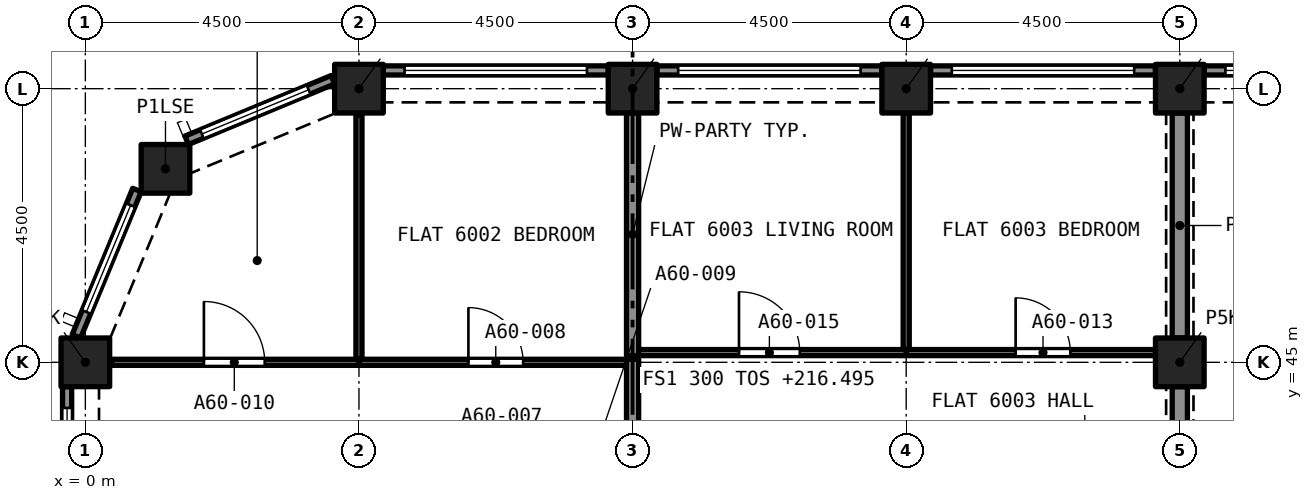
"""IFC4 building model, lengths in metres.
Left out: names, types, materials, properties, quantities, classifications, styles, units other than length and angle.
Written with IfcOpenShell. Run it as: python <this file> out.ifc"""

import sys

from ifc_helpers import new_model, si_unit, direction, frame, frame_2d, origin, origin_2d, place, context, subcontext, project, spatial, rectangle, extrude, element, fill, save


model = new_model("IFC4")
c1 = context("Model", 3, precision=1e-05, world=origin(), true_north=direction((0.0, 1.0)))
c2 = subcontext(c1, "Body", "Model", "MODEL_VIEW")
j1 = project(units=[si_unit("LENGTHUNIT", "METRE"), si_unit("PLANEANGLEUNIT", "RADIAN")], contexts=[c1])
p1 = place(None, origin())
s1 = spatial("IfcSite", under=j1, at=p1, CompositionType="ELEMENT")
p2 = place(p1, origin())
s2 = spatial("IfcBuilding", under=s1, at=p2, CompositionType="ELEMENT")
p3 = place(p2, frame((0.0, 0.0, 216.495)))
s3 = spatial("IfcBuildingStorey", under=s2, at=p3, CompositionType="ELEMENT", Elevation=216.495)
for number, where, z_axis, x_axis in (
    (1, (0.0, 45.0, 0.0), (0.0, 0.0, 1.0), (1.0, 0.0, 0.0)),
    (2, (18.0, 45.0, 0.0), (0.0, 0.0, 1.0), (1.0, 0.0, 0.0)),
    (3, (1.318, 48.182, 0.0), (0.0, 0.0, 1.0), (1.0, 0.0, 0.0)),
    (4, (4.5, 49.5, 0.0), (0.0, 0.0, 1.0), (1.0, 0.0, 0.0)),
    (5, (9.0, 49.5, 0.0), (0.0, 0.0, 1.0), (1.0, 0.0, 0.0)),
    (6, (13.5, 49.5, 0.0), (0.0, 0.0, 1.0), (1.0, 0.0, 0.0)),
    (7, (18.0, 49.5, 0.0), (0.0, 0.0, 1.0), (1.0, 0.0, 0.0)),
):
    element("IfcColumn", number, at=place(p3, frame(where, z_axis=z_axis, x_axis=x_axis)), inside=s3, PredefinedType="COLUMN", context=c2, shape_type="SweptSolid", body=[
        extrude(rectangle(XDim=0.8, YDim=0.8, at=origin_2d()), origin(), (0.0, 0.0, 1.0), 3.2),
    ])
p4 = place(p3, frame((18.4, 49.8, 0.0), z_axis=(0.0, 0.0, 1.0), x_axis=(1.0, 0.0, 0.0)))
e8 = element("IfcWall", 8, at=p4, inside=s3, PredefinedType="SOLIDWALL", context=c2, shape_type="SweptSolid", body=[
    extrude(rectangle(XDim=3.7, YDim=0.15, at=frame_2d((1.85, 0.0))), origin(), (0.0, 0.0, 1.0), 3.2),
])
p5 = place(p4, frame((0.35, 0.0, 0.45)))
e9 = element("IfcOpeningElement", 9, at=p5, cuts=e8, PredefinedType="OPENING", context=c2, shape_type="SweptSolid", body=[
    extrude(rectangle(XDim=3.0, YDim=1.95, at=frame_2d((1.5, 0.975))), frame((0.0, 0.085, 0.0), z_axis=(0.0, -1.0, 0.0), x_axis=(1.0, 0.0, 0.0)), (0.0, 0.0, 1.0), 0.17),
])
p6 = place(p3, frame((13.9, 49.8, 0.0), z_axis=(0.0, 0.0, 1.0), x_axis=(1.0, 0.0, 0.0)))
e10 = element("IfcWall", 10, at=p6, inside=s3, PredefinedType="SOLIDWALL", context=c2, shape_type="SweptSolid", body=[
    extrude(rectangle(XDim=3.7, YDim=0.15, at=frame_2d((1.85, 0.0))), origin(), (0.0, 0.0, 1.0), 3.2),
])
p7 = place(p6, frame((0.35, 0.0, 0.45)))
e11 = element("IfcOpeningElement", 11, at=p7, cuts=e10, PredefinedType="OPENING", context=c2, shape_type="SweptSolid", body=[
    extrude(rectangle(XDim=3.0, YDim=1.95, at=frame_2d((1.5, 0.975))), frame((0.0, 0.085, 0.0), z_axis=(0.0, -1.0, 0.0), x_axis=(1.0, 0.0, 0.0)), (0.0, 0.0, 1.0), 0.17),
])
p8 = place(p3, frame((9.4, 49.8, 0.0), z_axis=(0.0, 0.0, 1.0), x_axis=(1.0, 0.0, 0.0)))
e12 = element("IfcWall", 12, at=p8, inside=s3, PredefinedType="SOLIDWALL", context=c2, shape_type="SweptSolid", body=[
    extrude(rectangle(XDim=3.7, YDim=0.15, at=frame_2d((1.85, 0.0))), origin(), (0.0, 0.0, 1.0), 3.2),
])
p9 = place(p8, frame((0.35, 0.0, 0.45)))
e13 = element("IfcOpeningElement", 13, at=p9, cuts=e12, PredefinedType="OPENING", context=c2, shape_type="SweptSolid", body=[
    extrude(rectangle(XDim=3.0, YDim=1.95, at=frame_2d((1.5, 0.975))), frame((0.0, 0.085, 0.0), z_axis=(0.0, -1.0, 0.0), x_axis=(1.0, 0.0, 0.0)), (0.0, 0.0, 1.0), 0.17),
])
p10 = place(p3, frame((4.9, 49.8, 0.0), z_axis=(0.0, 0.0, 1.0), x_axis=(1.0, 0.0, 0.0)))
e14 = element("IfcWall", 14, at=p10, inside=s3, PredefinedType="SOLIDWALL", context=c2, shape_type="SweptSolid", body=[
    extrude(rectangle(XDim=3.7, YDim=0.15, at=frame_2d((1.85, 0.0))), origin(), (0.0, 0.0, 1.0), 3.2),
])
p11 = place(p10, frame((0.35, 0.0, 0.45)))
e15 = element("IfcOpeningElement", 15, at=p11, cuts=e14, PredefinedType="OPENING", context=c2, shape_type="SweptSolid", body=[
    extrude(rectangle(XDim=3.0, YDim=1.95, at=frame_2d((1.5, 0.975))), frame((0.0, 0.085, 0.0), z_axis=(0.0, -1.0, 0.0), x_axis=(1.0, 0.0, 0.0)), (0.0, 0.0, 1.0), 0.17),
])
p12 = place(p3, frame((1.667, 48.651, 0.0), z_axis=(0.0, 0.0, 1.0), x_axis=(0.923885342263, 0.382669406082, 0.0)))
e16 = element("IfcWall", 16, at=p12, inside=s3, PredefinedType="SOLIDWALL", context=c2, shape_type="SweptSolid", body=[
    extrude(rectangle(XDim=2.602, YDim=0.15, at=frame_2d((1.301, 0.0))), origin(), (0.0, 0.0, 1.0), 3.2),
])
p13 = place(p12, frame((0.27, 0.0, 0.45)))
e17 = element("IfcOpeningElement", 17, at=p13, cuts=e16, PredefinedType="OPENING", context=c2, shape_type="SweptSolid", body=[
    extrude(rectangle(XDim=1.9, YDim=1.95, at=frame_2d((0.95, 0.975))), frame((0.0, 0.085, 0.0), z_axis=(0.0, -1.0, 0.0), x_axis=(1.0, 0.0, 0.0)), (0.0, 0.0, 1.0), 0.17),
])
p14 = place(p3, frame((-0.147, 45.429, 0.0), z_axis=(0.0, 0.0, 1.0), x_axis=(0.382669406082, 0.923885342263, 0.0)))
e18 = element("IfcWall", 18, at=p14, inside=s3, PredefinedType="SOLIDWALL", context=c2, shape_type="SweptSolid", body=[
    extrude(rectangle(XDim=2.602, YDim=0.15, at=frame_2d((1.301, 0.0))), origin(), (0.0, 0.0, 1.0), 3.2),
])
p15 = place(p14, frame((0.432, 0.0, 0.45)))
e19 = element("IfcOpeningElement", 19, at=p15, cuts=e18, PredefinedType="OPENING", context=c2, shape_type="SweptSolid", body=[
    extrude(rectangle(XDim=1.9, YDim=1.95, at=frame_2d((0.95, 0.975))), frame((0.0, 0.085, 0.0), z_axis=(0.0, -1.0, 0.0), x_axis=(1.0, 0.0, 0.0)), (0.0, 0.0, 1.0), 0.17),
])
p16 = place(p3, frame((-0.3, 40.9, 0.0), z_axis=(0.0, 0.0, 1.0), x_axis=(0.0, 1.0, 0.0)))
e20 = element("IfcWall", 20, at=p16, inside=s3, PredefinedType="SOLIDWALL", context=c2, shape_type="SweptSolid", body=[
    extrude(rectangle(XDim=3.7, YDim=0.15, at=frame_2d((1.85, 0.0))), origin(), (0.0, 0.0, 1.0), 3.2),
])
p17 = place(p16, frame((0.35, 0.0, 0.45)))
e21 = element("IfcOpeningElement", 21, at=p17, cuts=e20, PredefinedType="OPENING", context=c2, shape_type="SweptSolid", body=[
    extrude(rectangle(XDim=3.0, YDim=1.95, at=frame_2d((1.5, 0.975))), frame((0.0, 0.085, 0.0), z_axis=(0.0, -1.0, 0.0), x_axis=(1.0, 0.0, 0.0)), (0.0, 0.0, 1.0), 0.17),
])
p18 = place(p3, frame((4.5, 45.0, 0.0), z_axis=(0.0, 0.0, 1.0), x_axis=(1.0, 0.0, 0.0)))
e22 = element("IfcWall", 22, at=p18, inside=s3, PredefinedType="PARTITIONING", context=c2, shape_type="SweptSolid", body=[
    extrude(rectangle(XDim=4.4, YDim=0.1, at=frame_2d((2.2, 0.0))), origin(), (0.0, 0.0, 1.0), 2.9),
])
p19 = place(p18, frame((1.8, 0.0, 0.0)))
e23 = element("IfcOpeningElement", 23, at=p19, cuts=e22, PredefinedType="OPENING", context=c2, shape_type="SweptSolid", body=[
    extrude(rectangle(XDim=0.9, YDim=2.1, at=frame_2d((0.45, 1.05))), frame((0.0, 0.06, 0.0), z_axis=(0.0, -1.0, 0.0), x_axis=(1.0, 0.0, 0.0)), (0.0, 0.0, 1.0), 0.12),
])
p20 = place(p3, frame((4.5, 45.05, 0.0), z_axis=(0.0, 0.0, 1.0), x_axis=(0.0, 1.0, 0.0)))
e24 = element("IfcWall", 24, at=p20, inside=s3, PredefinedType="PARTITIONING", context=c2, shape_type="SweptSolid", body=[
    extrude(rectangle(XDim=4.017, YDim=0.1, at=frame_2d((2.009, 0.0))), origin(), (0.0, 0.0, 1.0), 2.9),
])
p21 = place(p3, frame((9.0, 45.11, 0.0), z_axis=(0.0, 0.0, 1.0), x_axis=(0.0, 1.0, 0.0)))
e25 = element("IfcWall", 25, at=p21, inside=s3, PredefinedType="PARTITIONING", context=c2, shape_type="SweptSolid", body=[
    extrude(rectangle(XDim=3.99, YDim=0.2, at=frame_2d((1.995, 0.0))), origin(), (0.0, 0.0, 1.0), 2.9),
])
p22 = place(p3, frame((0.433, 45.0, 0.0), z_axis=(0.0, 0.0, 1.0), x_axis=(1.0, 0.0, 0.0)))
e26 = element("IfcWall", 26, at=p22, inside=s3, PredefinedType="PARTITIONING", context=c2, shape_type="SweptSolid", body=[
    extrude(rectangle(XDim=4.067, YDim=0.1, at=frame_2d((2.034, 0.0))), origin(), (0.0, 0.0, 1.0), 2.9),
])
p23 = place(p22, frame((1.517, 0.0, 0.0)))
e27 = element("IfcOpeningElement", 27, at=p23, cuts=e26, PredefinedType="OPENING", context=c2, shape_type="SweptSolid", body=[
    extrude(rectangle(XDim=1.0, YDim=2.1, at=frame_2d((0.5, 1.05))), frame((0.0, 0.06, 0.0), z_axis=(0.0, -1.0, 0.0), x_axis=(1.0, 0.0, 0.0)), (0.0, 0.0, 1.0), 0.12),
])
p24 = place(p3, frame((9.0, 43.677, 0.0), z_axis=(0.0, 0.0, 1.0), x_axis=(0.0, 1.0, 0.0)))
e28 = element("IfcWall", 28, at=p24, inside=s3, PredefinedType="PARTITIONING", context=c2, shape_type="SweptSolid", body=[
    extrude(rectangle(XDim=1.373, YDim=0.2, at=frame_2d((0.686, 0.0))), origin(), (0.0, 0.0, 1.0), 2.9),
])
p25 = place(p3, frame((13.5, 45.16, 0.0), z_axis=(0.0, 0.0, 1.0), x_axis=(1.0, 0.0, 0.0)))
e29 = element("IfcWall", 29, at=p25, inside=s3, PredefinedType="PARTITIONING", context=c2, shape_type="SweptSolid", body=[
    extrude(rectangle(XDim=4.1, YDim=0.1, at=frame_2d((2.05, 0.0))), origin(), (0.0, 0.0, 1.0), 2.9),
])
p26 = place(p25, frame((1.8, 0.0, 0.0)))
e30 = element("IfcOpeningElement", 30, at=p26, cuts=e29, PredefinedType="OPENING", context=c2, shape_type="SweptSolid", body=[
    extrude(rectangle(XDim=0.9, YDim=2.1, at=frame_2d((0.45, 1.05))), frame((0.0, 0.06, 0.0), z_axis=(0.0, -1.0, 0.0), x_axis=(1.0, 0.0, 0.0)), (0.0, 0.0, 1.0), 0.12),
])
p27 = place(p3, frame((13.5, 45.21, 0.0), z_axis=(0.0, 0.0, 1.0), x_axis=(0.0, 1.0, 0.0)))
e31 = element("IfcWall", 31, at=p27, inside=s3, PredefinedType="PARTITIONING", context=c2, shape_type="SweptSolid", body=[
    extrude(rectangle(XDim=3.89, YDim=0.1, at=frame_2d((1.945, 0.0))), origin(), (0.0, 0.0, 1.0), 2.9),
])
p28 = place(p3, frame((18.0, 45.4, 0.0), z_axis=(0.0, 0.0, 1.0), x_axis=(0.0, 1.0, 0.0)))
e32 = element("IfcWall", 32, at=p28, inside=s3, PredefinedType="PARTITIONING", context=c2, shape_type="SweptSolid", body=[
    extrude(rectangle(XDim=3.7, YDim=0.25, at=frame_2d((1.85, 0.0))), origin(), (0.0, 0.0, 1.0), 2.38),
])
p29 = place(p3, frame((9.1, 45.16, 0.0), z_axis=(0.0, 0.0, 1.0), x_axis=(1.0, 0.0, 0.0)))
e33 = element("IfcWall", 33, at=p29, inside=s3, PredefinedType="PARTITIONING", context=c2, shape_type="SweptSolid", body=[
    extrude(rectangle(XDim=4.4, YDim=0.1, at=frame_2d((2.2, 0.0))), origin(), (0.0, 0.0, 1.0), 2.9),
])
p30 = place(p29, frame((1.65, 0.0, 0.0)))
e34 = element("IfcOpeningElement", 34, at=p30, cuts=e33, PredefinedType="OPENING", context=c2, shape_type="SweptSolid", body=[
    extrude(rectangle(XDim=1.0, YDim=2.1, at=frame_2d((0.5, 1.05))), frame((0.0, 0.06, 0.0), z_axis=(0.0, -1.0, 0.0), x_axis=(1.0, 0.0, 0.0)), (0.0, 0.0, 1.0), 0.12),
])
p31 = place(p3, frame((18.0, 40.9, 0.0), z_axis=(0.0, 0.0, 1.0), x_axis=(0.0, 1.0, 0.0)))
e35 = element("IfcWall", 35, at=p31, inside=s3, PredefinedType="PARTITIONING", context=c2, shape_type="SweptSolid", body=[
    extrude(rectangle(XDim=3.7, YDim=0.25, at=frame_2d((1.85, 0.0))), origin(), (0.0, 0.0, 1.0), 2.38),
])
p32 = place(p5, origin())
e36 = element("IfcWindow", 36, at=p32, inside=s3, PartitioningType="SINGLE_PANEL", PredefinedType="WINDOW", context=c2, shape_type="SweptSolid", body=[
    extrude(rectangle(XDim=3.0, YDim=1.95, at=frame_2d((1.5, 0.975))), frame((0.0, 0.03, 0.0), z_axis=(0.0, -1.0, 0.0), x_axis=(1.0, 0.0, 0.0)), (0.0, 0.0, 1.0), 0.06),
])
fill(e9, e36)
p33 = place(p7, origin())
e37 = element("IfcWindow", 37, at=p33, inside=s3, PartitioningType="SINGLE_PANEL", PredefinedType="WINDOW", context=c2, shape_type="SweptSolid", body=[
    extrude(rectangle(XDim=3.0, YDim=1.95, at=frame_2d((1.5, 0.975))), frame((0.0, 0.03, 0.0), z_axis=(0.0, -1.0, 0.0), x_axis=(1.0, 0.0, 0.0)), (0.0, 0.0, 1.0), 0.06),
])
fill(e11, e37)
p34 = place(p9, origin())
e38 = element("IfcWindow", 38, at=p34, inside=s3, PartitioningType="SINGLE_PANEL", PredefinedType="WINDOW", context=c2, shape_type="SweptSolid", body=[
    extrude(rectangle(XDim=3.0, YDim=1.95, at=frame_2d((1.5, 0.975))), frame((0.0, 0.03, 0.0), z_axis=(0.0, -1.0, 0.0), x_axis=(1.0, 0.0, 0.0)), (0.0, 0.0, 1.0), 0.06),
])
fill(e13, e38)
p35 = place(p11, origin())
e39 = element("IfcWindow", 39, at=p35, inside=s3, PartitioningType="SINGLE_PANEL", PredefinedType="WINDOW", context=c2, shape_type="SweptSolid", body=[
    extrude(rectangle(XDim=3.0, YDim=1.95, at=frame_2d((1.5, 0.975))), frame((0.0, 0.03, 0.0), z_axis=(0.0, -1.0, 0.0), x_axis=(1.0, 0.0, 0.0)), (0.0, 0.0, 1.0), 0.06),
])
fill(e15, e39)
p36 = place(p13, origin())
e40 = element("IfcWindow", 40, at=p36, inside=s3, PartitioningType="SINGLE_PANEL", PredefinedType="WINDOW", context=c2, shape_type="SweptSolid", body=[
    extrude(rectangle(XDim=1.9, YDim=1.95, at=frame_2d((0.95, 0.975))), frame((0.0, 0.03, 0.0), z_axis=(0.0, -1.0, 0.0), x_axis=(1.0, 0.0, 0.0)), (0.0, 0.0, 1.0), 0.06),
])
fill(e17, e40)
p37 = place(p15, origin())
e41 = element("IfcWindow", 41, at=p37, inside=s3, PartitioningType="SINGLE_PANEL", PredefinedType="WINDOW", context=c2, shape_type="SweptSolid", body=[
    extrude(rectangle(XDim=1.9, YDim=1.95, at=frame_2d((0.95, 0.975))), frame((0.0, 0.03, 0.0), z_axis=(0.0, -1.0, 0.0), x_axis=(1.0, 0.0, 0.0)), (0.0, 0.0, 1.0), 0.06),
])
fill(e19, e41)
p38 = place(p17, origin())
e42 = element("IfcWindow", 42, at=p38, inside=s3, PartitioningType="SINGLE_PANEL", PredefinedType="WINDOW", context=c2, shape_type="SweptSolid", body=[
    extrude(rectangle(XDim=3.0, YDim=1.95, at=frame_2d((1.5, 0.975))), frame((0.0, 0.03, 0.0), z_axis=(0.0, -1.0, 0.0), x_axis=(1.0, 0.0, 0.0)), (0.0, 0.0, 1.0), 0.06),
])
fill(e21, e42)
p39 = place(p19, origin())
e43 = element("IfcDoor", 43, at=p39, inside=s3, OperationType="SINGLE_SWING_RIGHT", PredefinedType="DOOR", context=c2, shape_type="SweptSolid", body=[
    extrude(rectangle(XDim=0.9, YDim=2.1, at=frame_2d((0.45, 1.05))), frame((0.0, 0.025, 0.0), z_axis=(0.0, -1.0, 0.0), x_axis=(1.0, 0.0, 0.0)), (0.0, 0.0, 1.0), 0.05),
])
fill(e23, e43)
p40 = place(p23, origin())
e44 = element("IfcDoor", 44, at=p40, inside=s3, OperationType="SINGLE_SWING_LEFT", PredefinedType="DOOR", context=c2, shape_type="SweptSolid", body=[
    extrude(rectangle(XDim=1.0, YDim=2.1, at=frame_2d((0.5, 1.05))), frame((0.0, 0.025, 0.0), z_axis=(0.0, -1.0, 0.0), x_axis=(1.0, 0.0, 0.0)), (0.0, 0.0, 1.0), 0.05),
])
fill(e27, e44)
p41 = place(p26, origin())
e45 = element("IfcDoor", 45, at=p41, inside=s3, OperationType="SINGLE_SWING_RIGHT", PredefinedType="DOOR", context=c2, shape_type="SweptSolid", body=[
    extrude(rectangle(XDim=0.9, YDim=2.1, at=frame_2d((0.45, 1.05))), frame((0.0, 0.025, 0.0), z_axis=(0.0, -1.0, 0.0), x_axis=(1.0, 0.0, 0.0)), (0.0, 0.0, 1.0), 0.05),
])
fill(e30, e45)
p42 = place(p30, origin())
e46 = element("IfcDoor", 46, at=p42, inside=s3, OperationType="SINGLE_SWING_LEFT", PredefinedType="DOOR", context=c2, shape_type="SweptSolid", body=[
    extrude(rectangle(XDim=1.0, YDim=2.1, at=frame_2d((0.5, 1.05))), frame((0.0, 0.025, 0.0), z_axis=(0.0, -1.0, 0.0), x_axis=(1.0, 0.0, 0.0)), (0.0, 0.0, 1.0), 0.05),
])
fill(e34, e46)
save(model, sys.argv[1])
